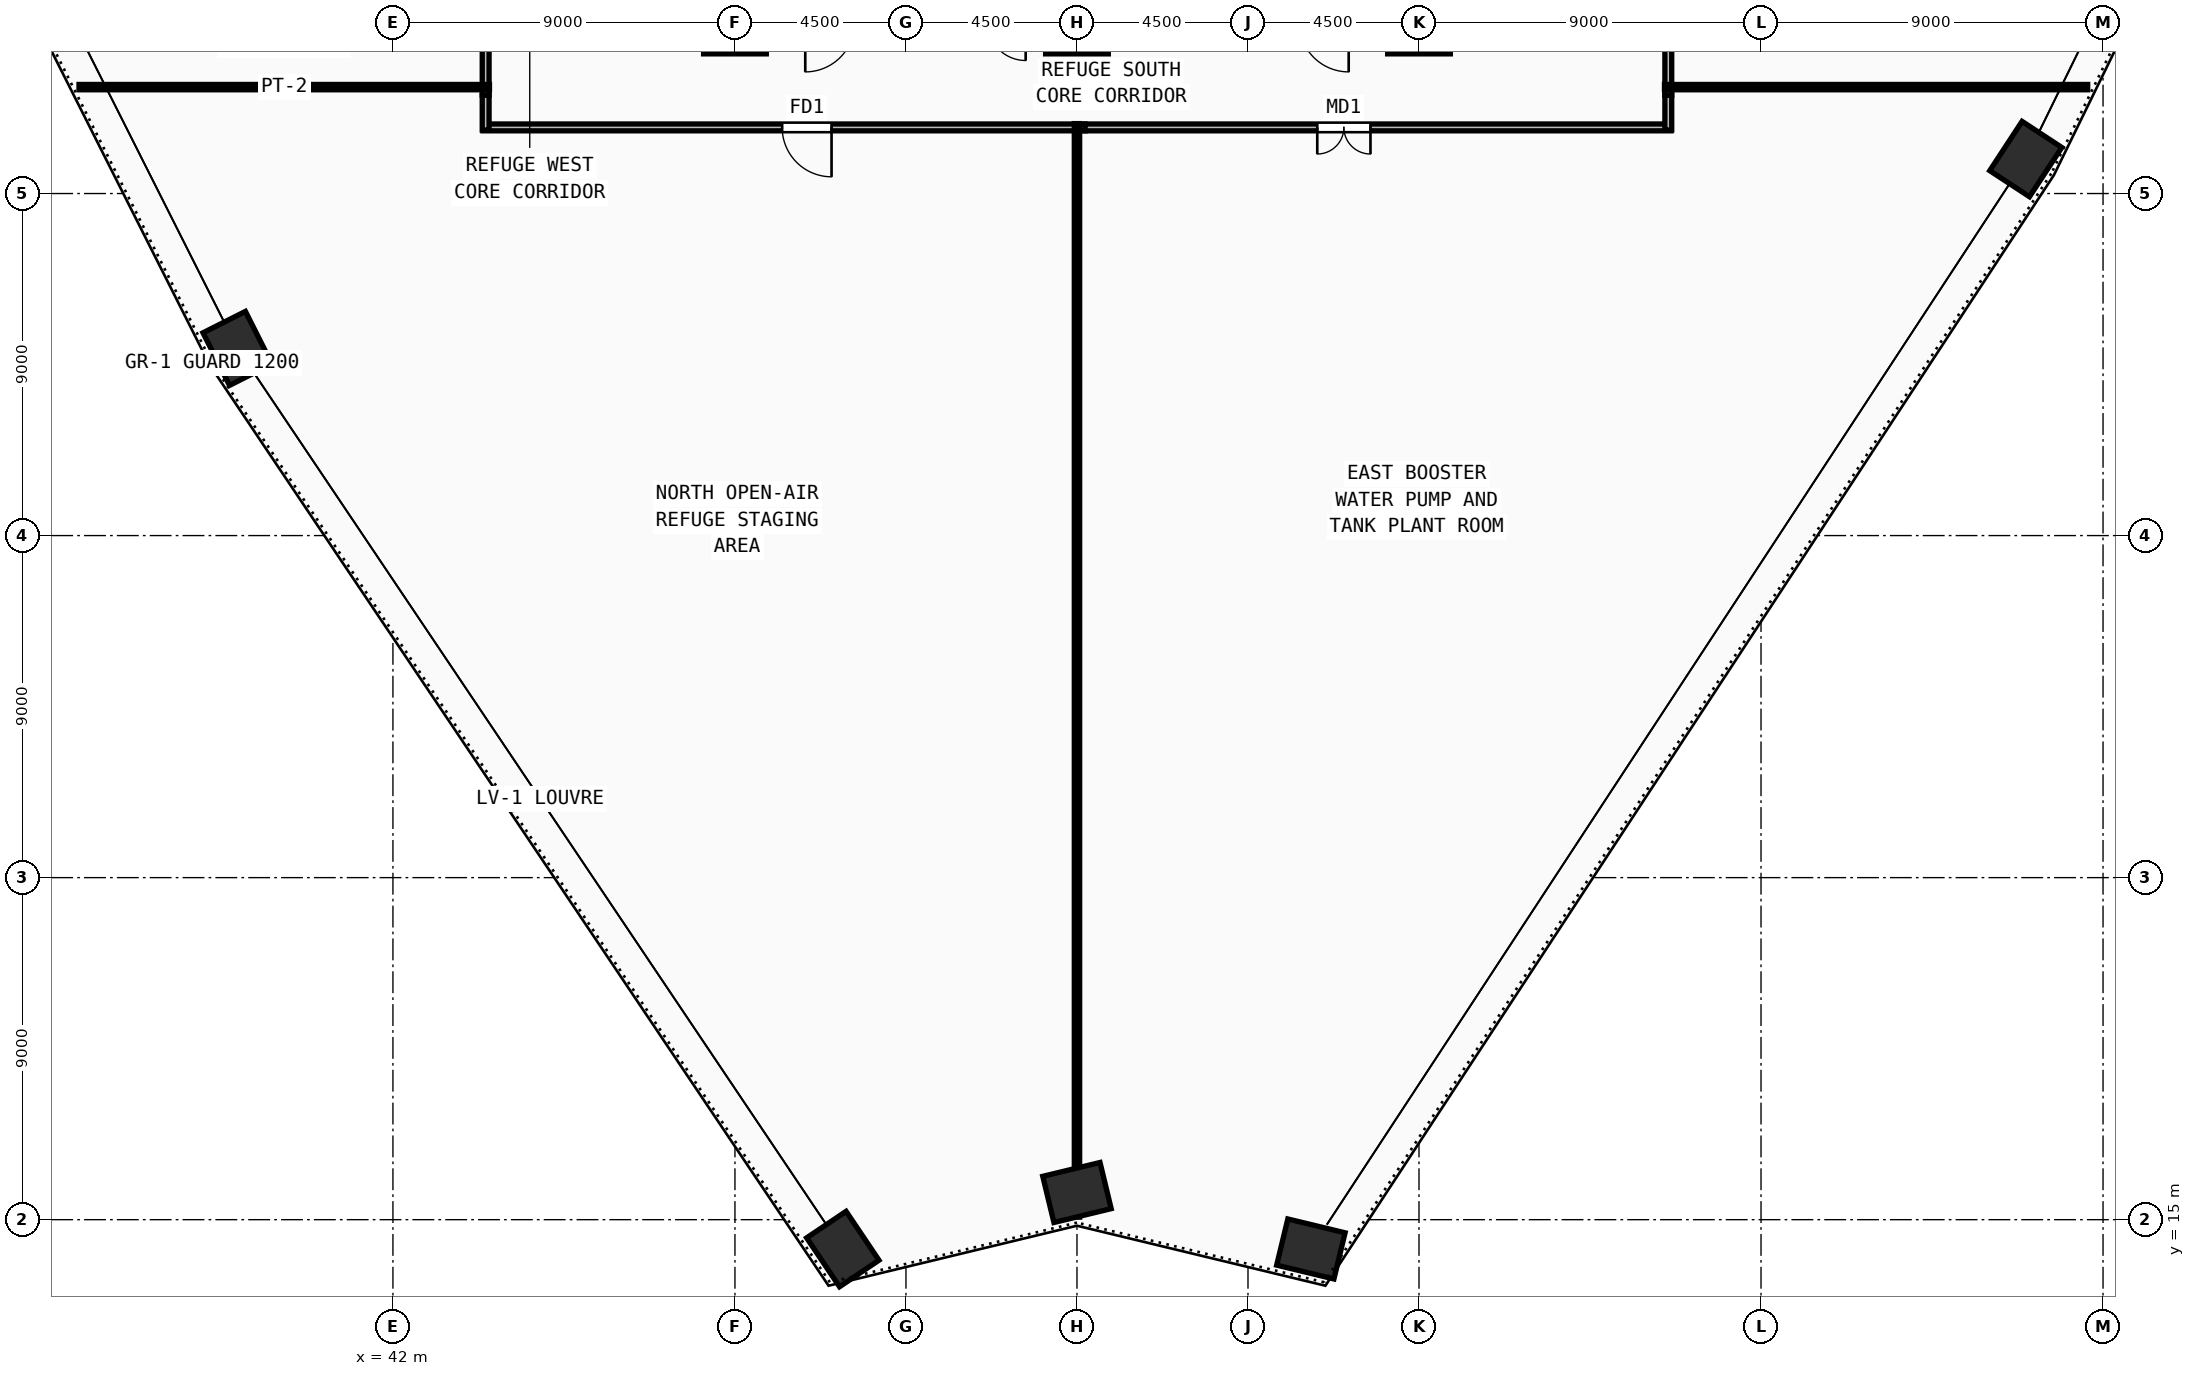
"""IFC4 building model, lengths in metres.
Left out: names, types, materials, properties, quantities, classifications, styles, units other than length and angle.
Written with IfcOpenShell. Run it as: python <this file> out.ifc"""

import sys

from ifc_helpers import new_model, si_unit, direction, frame, frame_2d, origin, origin_2d, place, context, subcontext, project, spatial, rectangle, extrude, source, transform, mapped, element, fill, save


model = new_model("IFC4")
c1 = context("Model", 3, precision=1e-05, world=origin(), true_north=direction((0.0, 1.0)))
c2 = subcontext(c1, "Body", "Model", "MODEL_VIEW")
j1 = project(units=[si_unit("LENGTHUNIT", "METRE"), si_unit("PLANEANGLEUNIT", "RADIAN")], contexts=[c1])
p1 = place(None, origin())
s1 = spatial("IfcSite", under=j1, at=p1, CompositionType="ELEMENT")
p2 = place(p1, origin())
s2 = spatial("IfcBuilding", under=s1, at=p2, CompositionType="ELEMENT")
p3 = place(p2, frame((0.0, 0.0, 93.0)))
s3 = spatial("IfcBuildingStorey", under=s2, at=p3, CompositionType="ELEMENT", Elevation=93.0)
m1 = source(origin(), c2, "Body", "SweptSolid", [
    extrude(rectangle(XDim=1.65, YDim=1.65, at=origin_2d()), origin(), (0.0, 0.0, 1.0), 4.5),
])
for number, where, z_axis, x_axis in (
    (1, (51.0, 46.5, 0.0), (0.0, 0.0, 1.0), (1.0, 0.0, 0.0)),
    (2, (60.0, 46.5, 0.0), (0.0, 0.0, 1.0), (1.0, 0.0, 0.0)),
    (3, (69.0, 46.5, 0.0), (0.0, 0.0, 1.0), (1.0, 0.0, 0.0)),
):
    element("IfcColumn", number, at=place(p3, frame(where, z_axis=z_axis, x_axis=x_axis)), inside=s3, PredefinedType="COLUMN", context=c2, shape_type="MappedRepresentation", body=[
        mapped(m1, transform((0.0, 0.0, 0.0), x_axis=(1.0, 0.0, 0.0), y_axis=(0.0, 1.0, 0.0), z_axis=(0.0, 0.0, 1.0), scale=1.0)),
    ])
m2 = source(origin(), c2, "Body", "SweptSolid", [
    extrude(rectangle(XDim=1.55, YDim=1.25, at=origin_2d()), origin(), (0.0, 0.0, 1.0), 4.5),
])
for number, where, z_axis, x_axis in (
    (4, (53.838, 14.227, 0.0), (0.0, 0.0, 1.0), (-0.558, 0.83, 0.0)),
    (5, (37.909, 37.925, 0.0), (0.0, 0.0, 1.0), (-0.45, 0.893, 0.0)),
    (6, (84.967, 42.907, 0.0), (0.0, 0.0, 1.0), (0.548, 0.836, 0.0)),
    (7, (66.155, 14.229, 0.0), (0.0, 0.0, 1.0), (-0.972, 0.235, 0.0)),
    (8, (60.0, 15.715, 0.0), (0.0, 0.0, 1.0), (0.972, 0.235, 0.0)),
):
    element("IfcColumn", number, at=place(p3, frame(where, z_axis=z_axis, x_axis=x_axis)), inside=s3, PredefinedType="COLUMN", context=c2, shape_type="MappedRepresentation", body=[
        mapped(m2, transform((0.0, 0.0, 0.0), x_axis=(1.0, 0.0, 0.0), y_axis=(0.0, 1.0, 0.0), z_axis=(0.0, 0.0, 1.0), scale=1.0)),
    ])
p4 = place(p3, frame((75.56, 67.015, 0.0), z_axis=(0.0, 0.0, 1.0), x_axis=(0.0, -1.0, 0.0)))
e9 = element("IfcWall", 9, at=p4, inside=s3, PredefinedType="PARTITIONING", context=c2, shape_type="SweptSolid", body=[
    extrude(rectangle(XDim=22.43, YDim=0.18, at=frame_2d((11.215, 0.0))), origin(), (0.0, 0.0, 1.0), 4.22),
])
m3 = source(origin(), c2, "Body", "SweptSolid", [
    extrude(rectangle(XDim=1.3, YDim=2.2, at=frame_2d((0.65, 1.1))), frame((0.0, 0.1, 0.0), z_axis=(0.0, -1.0, 0.0), x_axis=(1.0, 0.0, 0.0)), (0.0, 0.0, 1.0), 0.2),
])
p5 = place(p4, frame((10.565, 0.0, 0.0)))
e10 = element("IfcOpeningElement", 10, at=p5, cuts=e9, PredefinedType="OPENING", context=c2, shape_type="MappedRepresentation", body=[
    mapped(m3, transform((0.0, 0.0, 0.0), x_axis=(1.0, 0.0, 0.0), y_axis=(0.0, 1.0, 0.0), z_axis=(0.0, 0.0, 1.0), scale=1.0)),
])
p6 = place(p3, frame((60.215, 43.74, 0.0), z_axis=(0.0, 0.0, 1.0), x_axis=(-1.0, 0.0, 0.0)))
e11 = element("IfcWall", 11, at=p6, inside=s3, PredefinedType="PARTITIONING", context=c2, shape_type="SweptSolid", body=[
    extrude(rectangle(XDim=15.845, YDim=0.18, at=frame_2d((7.922, 0.0))), origin(), (0.0, 0.0, 1.0), 4.22),
])
p7 = place(p6, frame((6.673, 0.0, 0.0)))
e12 = element("IfcOpeningElement", 12, at=p7, cuts=e11, PredefinedType="OPENING", context=c2, shape_type="MappedRepresentation", body=[
    mapped(m3, transform((0.0, 0.0, 0.0), x_axis=(1.0, 0.0, 0.0), y_axis=(0.0, 1.0, 0.0), z_axis=(0.0, 0.0, 1.0), scale=1.0)),
])
p8 = place(p3, frame((75.63, 43.74, 0.0), z_axis=(0.0, 0.0, 1.0), x_axis=(-1.0, 0.0, 0.0)))
e13 = element("IfcWall", 13, at=p8, inside=s3, PredefinedType="PARTITIONING", context=c2, shape_type="SweptSolid", body=[
    extrude(rectangle(XDim=15.415, YDim=0.18, at=frame_2d((7.708, 0.0))), origin(), (0.0, 0.0, 1.0), 4.22),
])
m4 = source(origin(), c2, "Body", "SweptSolid", [
    extrude(rectangle(XDim=1.4, YDim=2.25, at=frame_2d((0.7, 1.125))), frame((0.0, 0.1, 0.0), z_axis=(0.0, -1.0, 0.0), x_axis=(1.0, 0.0, 0.0)), (0.0, 0.0, 1.0), 0.2),
])
p9 = place(p8, frame((7.907, 0.0, 0.0)))
e14 = element("IfcOpeningElement", 14, at=p9, cuts=e13, PredefinedType="OPENING", context=c2, shape_type="MappedRepresentation", body=[
    mapped(m4, transform((0.0, 0.0, 0.0), x_axis=(1.0, 0.0, 0.0), y_axis=(0.0, 1.0, 0.0), z_axis=(0.0, 0.0, 1.0), scale=1.0)),
])
p10 = place(p3, frame((44.44, 44.585, 0.0), z_axis=(0.0, 0.0, 1.0), x_axis=(0.0, 1.0, 0.0)))
e15 = element("IfcWall", 15, at=p10, inside=s3, PredefinedType="PARTITIONING", context=c2, shape_type="SweptSolid", body=[
    extrude(rectangle(XDim=2.755, YDim=0.18, at=frame_2d((1.377, 0.0))), origin(), (0.0, 0.0, 1.0), 4.22),
])
for number, where, z_axis, x_axis in (
    (16, (44.44, 43.67, 0.0), (0.0, 0.0, 1.0), (0.0, 1.0, 0.0)),
    (17, (75.56, 44.585, 0.0), (0.0, 0.0, 1.0), (0.0, -1.0, 0.0)),
):
    element("IfcWall", number, at=place(p3, frame(where, z_axis=z_axis, x_axis=x_axis)), inside=s3, PredefinedType="PARTITIONING", context=c2, shape_type="SweptSolid", body=[
        extrude(rectangle(XDim=0.915, YDim=0.18, at=frame_2d((0.458, 0.0))), origin(), (0.0, 0.0, 1.0), 4.22),
    ])
p11 = place(p3, frame((44.54, 44.8, 0.0), z_axis=(0.0, 0.0, 1.0), x_axis=(-1.0, 0.0, 0.0)))
e18 = element("IfcWall", 18, at=p11, inside=s3, PredefinedType="PARTITIONING", context=c2, shape_type="SweptSolid", body=[
    extrude(rectangle(XDim=10.8, YDim=0.14, at=frame_2d((5.4, 0.0))), origin(), (0.0, 0.0, 1.0), 4.22),
])
p12 = place(p3, frame((75.46, 44.8, 0.0), z_axis=(0.0, 0.0, 1.0), x_axis=(1.0, 0.0, 0.0)))
e19 = element("IfcWall", 19, at=p12, inside=s3, PredefinedType="PARTITIONING", context=c2, shape_type="SweptSolid", body=[
    extrude(rectangle(XDim=11.136, YDim=0.14, at=frame_2d((5.568, 0.0))), origin(), (0.0, 0.0, 1.0), 3.355),
])
p13 = place(p3, frame((60.0, 43.84, 0.0), z_axis=(0.0, 0.0, 1.0), x_axis=(0.0, -1.0, 0.0)))
e20 = element("IfcWall", 20, at=p13, inside=s3, PredefinedType="PARTITIONING", context=c2, shape_type="SweptSolid", body=[
    extrude(rectangle(XDim=28.773, YDim=0.14, at=frame_2d((14.387, 0.0))), origin(), (0.0, 0.0, 1.0), 4.22),
])
m5 = source(origin(), c2, "Body", "SweptSolid", [
    extrude(rectangle(XDim=1.3, YDim=2.2, at=frame_2d((0.65, 1.1))), frame((0.0, 0.025, 0.0), z_axis=(0.0, -1.0, 0.0), x_axis=(1.0, 0.0, 0.0)), (0.0, 0.0, 1.0), 0.05),
])
p14 = place(p7, origin())
e21 = element("IfcDoor", 21, at=p14, inside=s3, OperationType="SINGLE_SWING_LEFT", PredefinedType="DOOR", context=c2, shape_type="MappedRepresentation", body=[
    mapped(m5, transform((0.0, 0.0, 0.0), x_axis=(1.0, 0.0, 0.0), y_axis=(0.0, 1.0, 0.0), z_axis=(0.0, 0.0, 1.0), scale=1.0)),
])
fill(e12, e21)
m6 = source(origin(), c2, "Body", "SweptSolid", [
    extrude(rectangle(XDim=1.4, YDim=2.25, at=frame_2d((0.7, 1.125))), frame((0.0, 0.025, 0.0), z_axis=(0.0, -1.0, 0.0), x_axis=(1.0, 0.0, 0.0)), (0.0, 0.0, 1.0), 0.05),
])
p15 = place(p9, origin())
e22 = element("IfcDoor", 22, at=p15, inside=s3, OperationType="DOUBLE_DOOR_SINGLE_SWING", PredefinedType="DOOR", context=c2, shape_type="MappedRepresentation", body=[
    mapped(m6, transform((0.0, 0.0, 0.0), x_axis=(1.0, 0.0, 0.0), y_axis=(0.0, 1.0, 0.0), z_axis=(0.0, 0.0, 1.0), scale=1.0)),
])
fill(e14, e22)
save(model, sys.argv[1])
